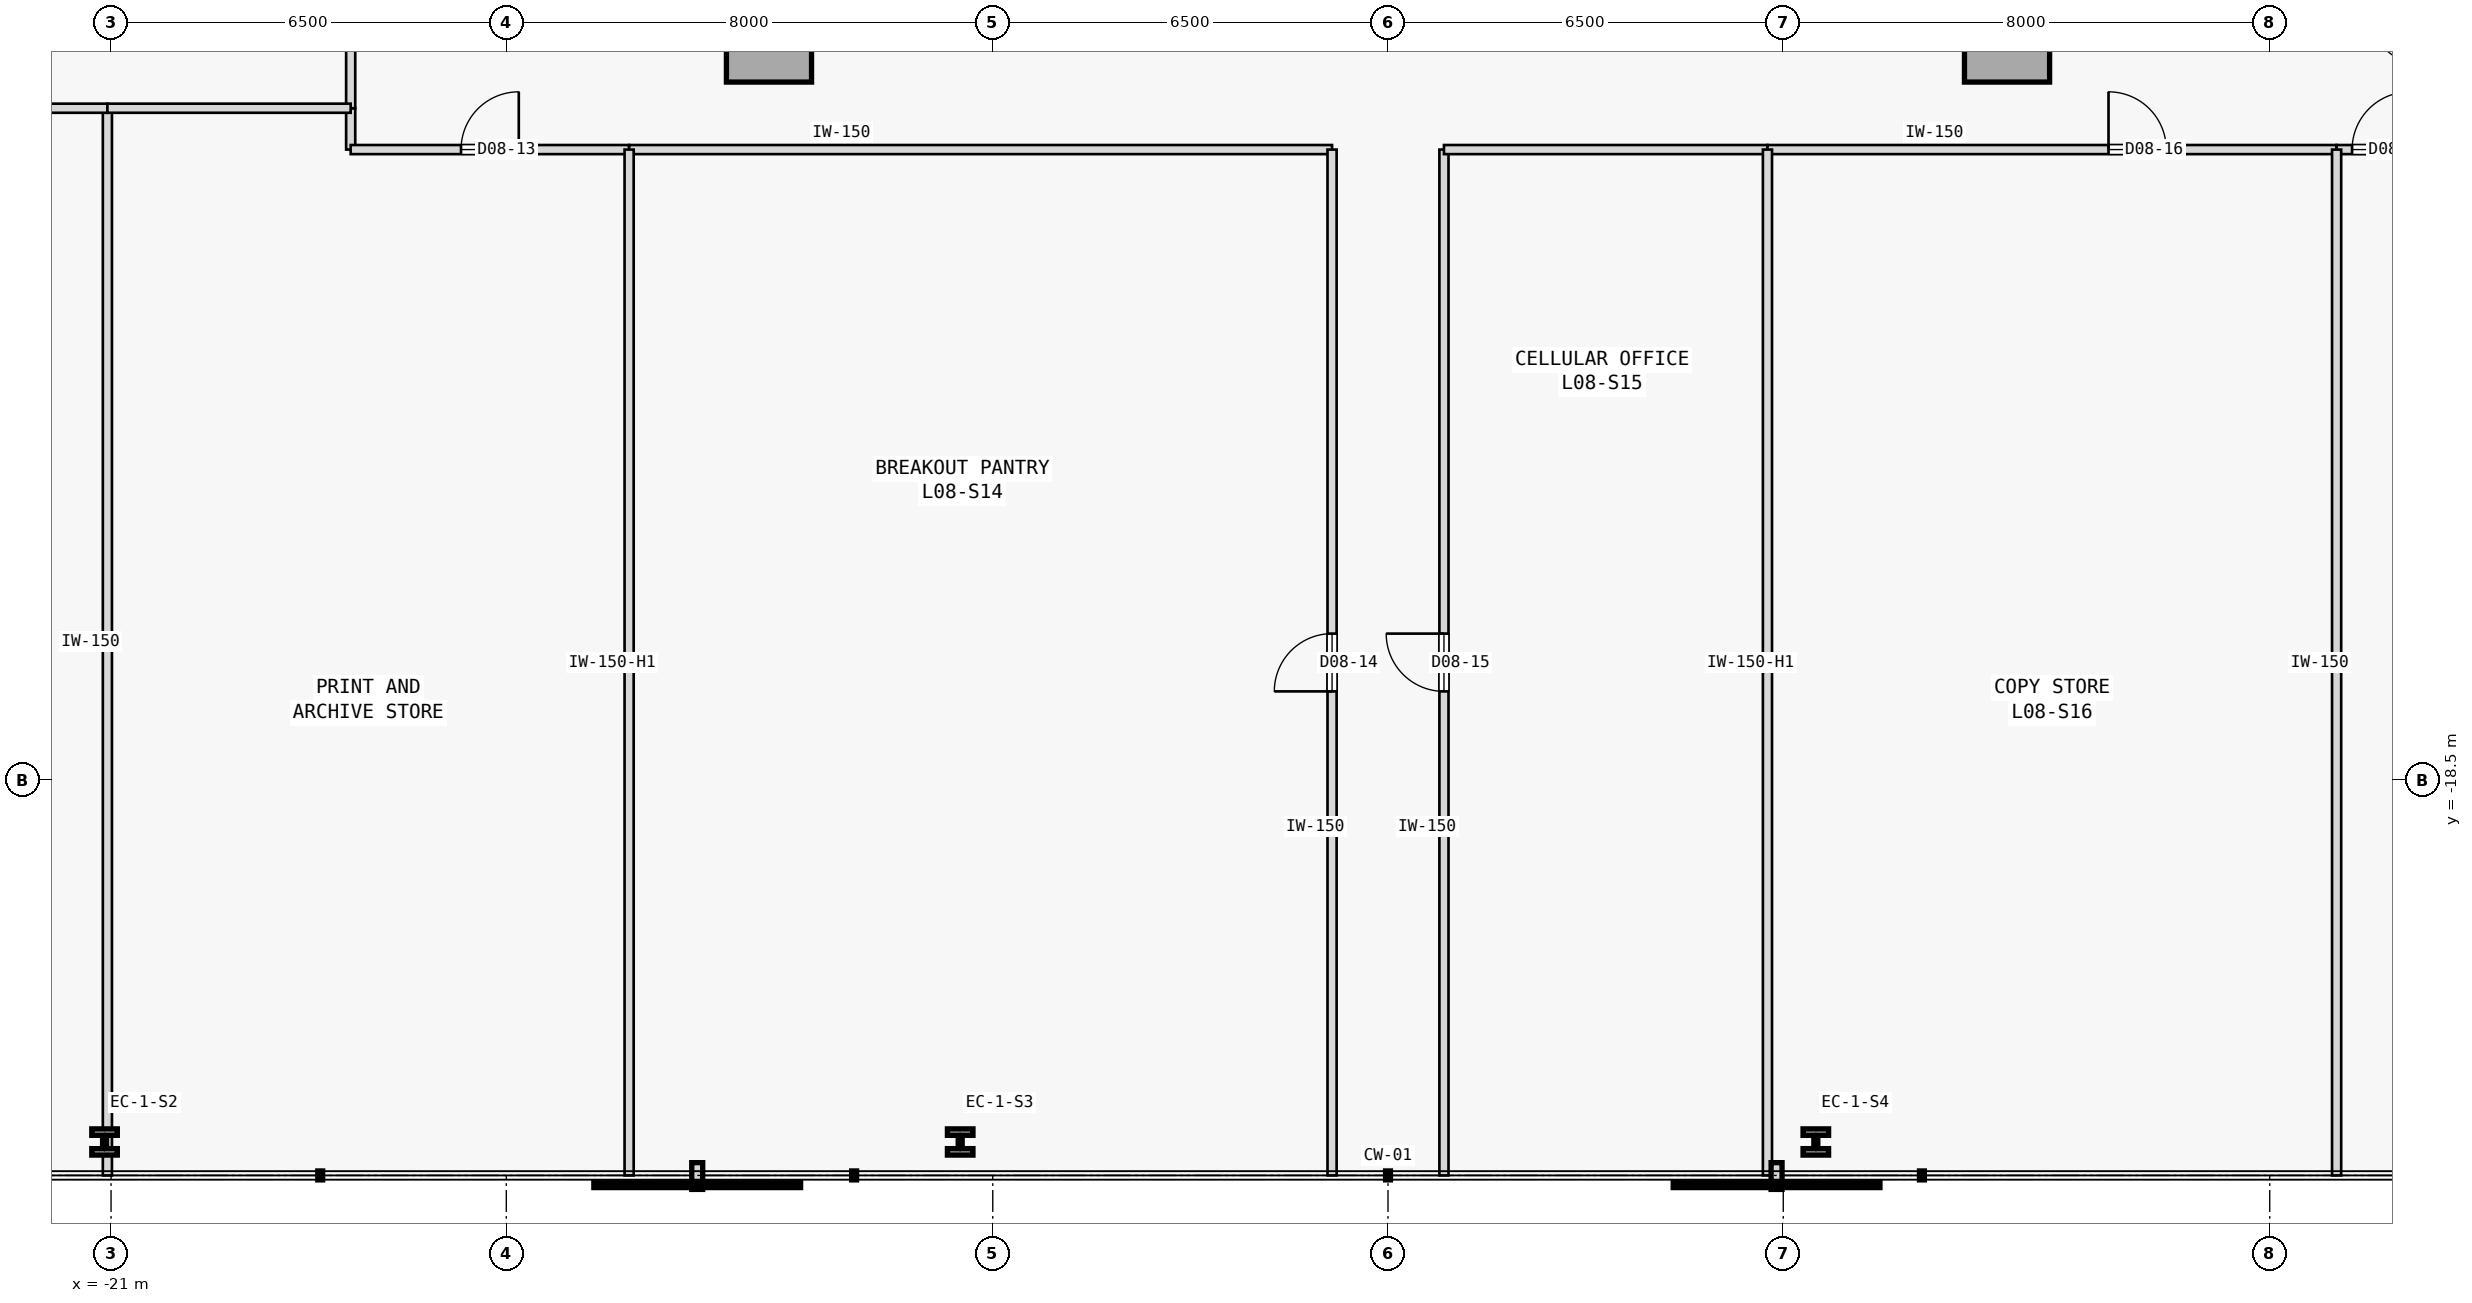
"""IFC4 building model, lengths in metres.
Left out: names, types, materials, properties, quantities, classifications, styles, units other than length and angle.
Written with IfcOpenShell. Run it as: python <this file> out.ifc"""

import sys

from ifc_helpers import new_model, si_unit, direction, frame, frame_2d, origin, origin_2d, place, context, subcontext, project, spatial, rectangle, i_section, extrude, element, fill, save


model = new_model("IFC4")
c1 = context("Model", 3, precision=1e-05, world=origin(), true_north=direction((0.0, 1.0)))
c2 = subcontext(c1, "Body", "Model", "MODEL_VIEW")
j1 = project(units=[si_unit("LENGTHUNIT", "METRE"), si_unit("PLANEANGLEUNIT", "RADIAN")], contexts=[c1])
p1 = place(None, origin())
s1 = spatial("IfcSite", under=j1, at=p1, CompositionType="ELEMENT")
p2 = place(p1, origin())
s2 = spatial("IfcBuilding", under=s1, at=p2, CompositionType="ELEMENT")
p3 = place(p2, frame((0.0, 0.0, 37.0)))
s3 = spatial("IfcBuildingStorey", under=s2, at=p3, CompositionType="ELEMENT", Elevation=37.0)
for number, where, z_axis, x_axis in (
    (1, (-10.18, -6.32, 0.0), (0.0, 0.0, 1.0), (1.0, 0.0, 0.0)),
    (2, (10.18, -6.32, 0.0), (0.0, 0.0, 1.0), (1.0, 0.0, 0.0)),
):
    element("IfcColumn", number, at=place(p3, frame(where, z_axis=z_axis, x_axis=x_axis)), inside=s3, PredefinedType="COLUMN", context=c2, shape_type="SweptSolid", body=[
        extrude(rectangle(XDim=1.4, YDim=1.4, at=origin_2d()), origin(), (0.0, 0.0, 1.0), 3.8),
    ])
for number, where, z_axis, x_axis in (
    (3, (-21.107, -24.45, 0.0), (0.0, 0.0, 1.0), (1.0, 0.0, 0.0)),
    (4, (-7.036, -24.45, 0.0), (0.0, 0.0, 1.0), (1.0, 0.0, 0.0)),
    (5, (7.036, -24.45, 0.0), (0.0, 0.0, 1.0), (1.0, 0.0, 0.0)),
):
    element("IfcColumn", number, at=place(p3, frame(where, z_axis=z_axis, x_axis=x_axis)), inside=s3, PredefinedType="COLUMN", context=c2, shape_type="SweptSolid", body=[
        extrude(i_section(OverallWidth=0.42, OverallDepth=0.431, WebThickness=0.065, FlangeThickness=0.106, FilletRadius=0.015, at=origin_2d()), origin(), (0.0, 0.0, 1.0), 3.8),
    ])
p4 = place(p3, frame((-17.059, -8.13, 0.0), z_axis=(0.0, 0.0, 1.0), x_axis=(0.0, 1.0, 0.0)))
e6 = element("IfcWall", 6, at=p4, inside=s3, PredefinedType="PARTITIONING", context=c2, shape_type="SweptSolid", body=[
    extrude(rectangle(XDim=0.68, YDim=0.15, at=frame_2d((0.34, 0.0))), origin(), (0.0, 0.0, 1.0), 3.575),
])
p5 = place(p3, frame((-17.059, -8.13, 0.0), z_axis=(0.0, 0.0, 1.0), x_axis=(1.0, 0.0, 0.0)))
e7 = element("IfcWall", 7, at=p5, inside=s3, PredefinedType="PARTITIONING", context=c2, shape_type="SweptSolid", body=[
    extrude(rectangle(XDim=4.579, YDim=0.15, at=frame_2d((2.29, 0.0))), origin(), (0.0, 0.0, 1.0), 3.575),
])
p6 = place(p5, frame((1.814, 0.0, 0.0)))
e8 = element("IfcOpeningElement", 8, at=p6, cuts=e7, PredefinedType="OPENING", context=c2, shape_type="SweptSolid", body=[
    extrude(rectangle(XDim=0.95, YDim=2.15, at=frame_2d((0.475, 1.075))), frame((0.0, 0.085, 0.0), z_axis=(0.0, -1.0, 0.0), x_axis=(1.0, 0.0, 0.0)), (0.0, 0.0, 1.0), 0.17),
])
p7 = place(p3, frame((-12.48, -8.13, 0.0), z_axis=(0.0, 0.0, 1.0), x_axis=(1.0, 0.0, 0.0)))
e9 = element("IfcWall", 9, at=p7, inside=s3, PredefinedType="PARTITIONING", context=c2, shape_type="SweptSolid", body=[
    extrude(rectangle(XDim=11.56, YDim=0.15, at=frame_2d((5.78, 0.0))), origin(), (0.0, 0.0, 1.0), 3.575),
])
p8 = place(p3, frame((-0.92, -25.0, 0.0), z_axis=(0.0, 0.0, 1.0), x_axis=(0.0, 1.0, 0.0)))
e10 = element("IfcWall", 10, at=p8, inside=s3, PredefinedType="PARTITIONING", context=c2, shape_type="SweptSolid", body=[
    extrude(rectangle(XDim=16.87, YDim=0.15, at=frame_2d((8.435, 0.0))), origin(), (0.0, 0.0, 1.0), 3.575),
])
p9 = place(p8, frame((7.96, 0.0, 0.0)))
e11 = element("IfcOpeningElement", 11, at=p9, cuts=e10, PredefinedType="OPENING", context=c2, shape_type="SweptSolid", body=[
    extrude(rectangle(XDim=0.95, YDim=2.15, at=frame_2d((0.475, 1.075))), frame((0.0, 0.085, 0.0), z_axis=(0.0, -1.0, 0.0), x_axis=(1.0, 0.0, 0.0)), (0.0, 0.0, 1.0), 0.17),
])
p10 = place(p3, frame((0.92, -25.0, 0.0), z_axis=(0.0, 0.0, 1.0), x_axis=(0.0, 1.0, 0.0)))
e12 = element("IfcWall", 12, at=p10, inside=s3, PredefinedType="PARTITIONING", context=c2, shape_type="SweptSolid", body=[
    extrude(rectangle(XDim=16.87, YDim=0.15, at=frame_2d((8.435, 0.0))), origin(), (0.0, 0.0, 1.0), 3.575),
])
p11 = place(p10, frame((7.96, 0.0, 0.0)))
e13 = element("IfcOpeningElement", 13, at=p11, cuts=e12, PredefinedType="OPENING", context=c2, shape_type="SweptSolid", body=[
    extrude(rectangle(XDim=0.95, YDim=2.15, at=frame_2d((0.475, 1.075))), frame((0.0, 0.085, 0.0), z_axis=(0.0, -1.0, 0.0), x_axis=(1.0, 0.0, 0.0)), (0.0, 0.0, 1.0), 0.17),
])
p12 = place(p3, frame((0.92, -8.13, 0.0), z_axis=(0.0, 0.0, 1.0), x_axis=(1.0, 0.0, 0.0)))
e14 = element("IfcWall", 14, at=p12, inside=s3, PredefinedType="PARTITIONING", context=c2, shape_type="SweptSolid", body=[
    extrude(rectangle(XDim=5.32, YDim=0.15, at=frame_2d((2.66, 0.0))), origin(), (0.0, 0.0, 1.0), 3.575),
])
p13 = place(p3, frame((6.24, -8.13, 0.0), z_axis=(0.0, 0.0, 1.0), x_axis=(1.0, 0.0, 0.0)))
e15 = element("IfcWall", 15, at=p13, inside=s3, PredefinedType="PARTITIONING", context=c2, shape_type="SweptSolid", body=[
    extrude(rectangle(XDim=9.36, YDim=0.15, at=frame_2d((4.68, 0.0))), origin(), (0.0, 0.0, 1.0), 3.575),
])
p14 = place(p13, frame((5.609, 0.0, 0.0)))
e16 = element("IfcOpeningElement", 16, at=p14, cuts=e15, PredefinedType="OPENING", context=c2, shape_type="SweptSolid", body=[
    extrude(rectangle(XDim=0.95, YDim=2.15, at=frame_2d((0.475, 1.075))), frame((0.0, 0.085, 0.0), z_axis=(0.0, -1.0, 0.0), x_axis=(1.0, 0.0, 0.0)), (0.0, 0.0, 1.0), 0.17),
])
p15 = place(p3, frame((15.6, -8.13, 0.0), z_axis=(0.0, 0.0, 1.0), x_axis=(1.0, 0.0, 0.0)))
e17 = element("IfcWall", 17, at=p15, inside=s3, PredefinedType="PARTITIONING", context=c2, shape_type="SweptSolid", body=[
    extrude(rectangle(XDim=1.459, YDim=0.15, at=frame_2d((0.729, 0.0))), origin(), (0.0, 0.0, 1.0), 3.575),
])
p16 = place(p15, frame((0.254, 0.0, 0.0)))
e18 = element("IfcOpeningElement", 18, at=p16, cuts=e17, PredefinedType="OPENING", context=c2, shape_type="SweptSolid", body=[
    extrude(rectangle(XDim=0.95, YDim=2.15, at=frame_2d((0.475, 1.075))), frame((0.0, 0.085, 0.0), z_axis=(0.0, -1.0, 0.0), x_axis=(1.0, 0.0, 0.0)), (0.0, 0.0, 1.0), 0.17),
])
p17 = place(p3, frame((-17.059, -7.45, 0.0), z_axis=(0.0, 0.0, 1.0), x_axis=(0.0, 1.0, 0.0)))
e19 = element("IfcWall", 19, at=p17, inside=s3, PredefinedType="PARTITIONING", context=c2, shape_type="SweptSolid", body=[
    extrude(rectangle(XDim=3.129, YDim=0.15, at=frame_2d((1.564, 0.0))), origin(), (0.0, 0.0, 1.0), 3.575),
])
p18 = place(p17, frame((1.09, 0.0, 0.0)))
e20 = element("IfcOpeningElement", 20, at=p18, cuts=e19, PredefinedType="OPENING", context=c2, shape_type="SweptSolid", body=[
    extrude(rectangle(XDim=0.95, YDim=2.15, at=frame_2d((0.475, 1.075))), frame((0.0, 0.085, 0.0), z_axis=(0.0, -1.0, 0.0), x_axis=(1.0, 0.0, 0.0)), (0.0, 0.0, 1.0), 0.17),
])
p19 = place(p3, frame((-21.06, -25.0, 0.0), z_axis=(0.0, 0.0, 1.0), x_axis=(0.0, 1.0, 0.0)))
e21 = element("IfcWall", 21, at=p19, inside=s3, PredefinedType="PARTITIONING", context=c2, shape_type="SweptSolid", body=[
    extrude(rectangle(XDim=17.55, YDim=0.15, at=frame_2d((8.775, 0.0))), origin(), (0.0, 0.0, 1.0), 3.575),
])
p20 = place(p3, frame((-29.64, -7.45, 0.0), z_axis=(0.0, 0.0, 1.0), x_axis=(1.0, 0.0, 0.0)))
e22 = element("IfcWall", 22, at=p20, inside=s3, PredefinedType="PARTITIONING", context=c2, shape_type="SweptSolid", body=[
    extrude(rectangle(XDim=8.58, YDim=0.15, at=frame_2d((4.29, 0.0))), origin(), (0.0, 0.0, 1.0), 3.575),
])
p21 = place(p3, frame((-12.48, -25.0, 0.0), z_axis=(0.0, 0.0, 1.0), x_axis=(0.0, 1.0, 0.0)))
e23 = element("IfcWall", 23, at=p21, inside=s3, PredefinedType="PARTITIONING", context=c2, shape_type="SweptSolid", body=[
    extrude(rectangle(XDim=16.87, YDim=0.15, at=frame_2d((8.435, 0.0))), origin(), (0.0, 0.0, 1.0), 3.125),
])
p22 = place(p3, frame((-21.06, -7.45, 0.0), z_axis=(0.0, 0.0, 1.0), x_axis=(1.0, 0.0, 0.0)))
e24 = element("IfcWall", 24, at=p22, inside=s3, PredefinedType="PARTITIONING", context=c2, shape_type="SweptSolid", body=[
    extrude(rectangle(XDim=4.001, YDim=0.15, at=frame_2d((2.0, 0.0))), origin(), (0.0, 0.0, 1.0), 3.575),
])
p23 = place(p3, frame((6.24, -25.0, 0.0), z_axis=(0.0, 0.0, 1.0), x_axis=(0.0, 1.0, 0.0)))
e25 = element("IfcWall", 25, at=p23, inside=s3, PredefinedType="PARTITIONING", context=c2, shape_type="SweptSolid", body=[
    extrude(rectangle(XDim=16.87, YDim=0.15, at=frame_2d((8.435, 0.0))), origin(), (0.0, 0.0, 1.0), 3.125),
])
p24 = place(p3, frame((15.6, -25.0, 0.0), z_axis=(0.0, 0.0, 1.0), x_axis=(0.0, 1.0, 0.0)))
e26 = element("IfcWall", 26, at=p24, inside=s3, PredefinedType="PARTITIONING", context=c2, shape_type="SweptSolid", body=[
    extrude(rectangle(XDim=16.87, YDim=0.15, at=frame_2d((8.435, 0.0))), origin(), (0.0, 0.0, 1.0), 3.575),
])
p25 = place(p6, origin())
e27 = element("IfcDoor", 27, at=p25, inside=s3, OperationType="SINGLE_SWING_RIGHT", PredefinedType="DOOR", context=c2, shape_type="SweptSolid", body=[
    extrude(rectangle(XDim=0.95, YDim=2.15, at=frame_2d((0.475, 1.075))), frame((0.0, 0.025, 0.0), z_axis=(0.0, -1.0, 0.0), x_axis=(1.0, 0.0, 0.0)), (0.0, 0.0, 1.0), 0.05),
])
fill(e8, e27)
p26 = place(p9, origin())
e28 = element("IfcDoor", 28, at=p26, inside=s3, OperationType="SINGLE_SWING_LEFT", PredefinedType="DOOR", context=c2, shape_type="SweptSolid", body=[
    extrude(rectangle(XDim=0.95, YDim=2.15, at=frame_2d((0.475, 1.075))), frame((0.0, 0.025, 0.0), z_axis=(0.0, -1.0, 0.0), x_axis=(1.0, 0.0, 0.0)), (0.0, 0.0, 1.0), 0.05),
])
fill(e11, e28)
p27 = place(p11, origin())
e29 = element("IfcDoor", 29, at=p27, inside=s3, OperationType="SINGLE_SWING_RIGHT", PredefinedType="DOOR", context=c2, shape_type="SweptSolid", body=[
    extrude(rectangle(XDim=0.95, YDim=2.15, at=frame_2d((0.475, 1.075))), frame((0.0, 0.025, 0.0), z_axis=(0.0, -1.0, 0.0), x_axis=(1.0, 0.0, 0.0)), (0.0, 0.0, 1.0), 0.05),
])
fill(e13, e29)
p28 = place(p14, origin())
e30 = element("IfcDoor", 30, at=p28, inside=s3, OperationType="SINGLE_SWING_LEFT", PredefinedType="DOOR", context=c2, shape_type="SweptSolid", body=[
    extrude(rectangle(XDim=0.95, YDim=2.15, at=frame_2d((0.475, 1.075))), frame((0.0, 0.025, 0.0), z_axis=(0.0, -1.0, 0.0), x_axis=(1.0, 0.0, 0.0)), (0.0, 0.0, 1.0), 0.05),
])
fill(e16, e30)
p29 = place(p16, origin())
e31 = element("IfcDoor", 31, at=p29, inside=s3, OperationType="SINGLE_SWING_RIGHT", PredefinedType="DOOR", context=c2, shape_type="SweptSolid", body=[
    extrude(rectangle(XDim=0.95, YDim=2.15, at=frame_2d((0.475, 1.075))), frame((0.0, 0.025, 0.0), z_axis=(0.0, -1.0, 0.0), x_axis=(1.0, 0.0, 0.0)), (0.0, 0.0, 1.0), 0.05),
])
fill(e18, e31)
save(model, sys.argv[1])
